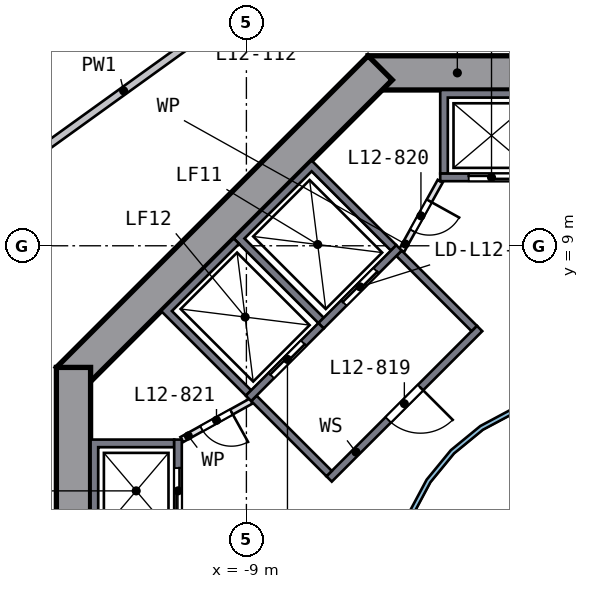
"""IFC4 building model, lengths in metres.
Left out: names, types, materials, properties, quantities, classifications, styles, units other than length and angle.
Written with IfcOpenShell. Run it as: python <this file> out.ifc"""

import sys

from ifc_helpers import new_model, si_unit, direction, frame, frame_2d, origin, place, context, subcontext, project, spatial, polyline, rectangle, outline, extrude, element, fill, save


model = new_model("IFC4")
c1 = context("Model", 3, precision=1e-05, world=origin(), true_north=direction((0.0, 1.0)))
c2 = subcontext(c1, "Body", "Model", "MODEL_VIEW")
j1 = project(units=[si_unit("LENGTHUNIT", "METRE"), si_unit("PLANEANGLEUNIT", "RADIAN")], contexts=[c1])
p1 = place(None, origin())
s1 = spatial("IfcSite", under=j1, at=p1, CompositionType="ELEMENT")
p2 = place(p1, origin())
s2 = spatial("IfcBuilding", under=s1, at=p2, CompositionType="ELEMENT")
p3 = place(p2, frame((0.0, 0.0, 56.5)))
s3 = spatial("IfcBuildingStorey", under=s2, at=p3, CompositionType="ELEMENT", Elevation=56.5)
p4 = place(p3, frame((5.799, 13.55, 0.0), z_axis=(0.0, 0.0, 1.0), x_axis=(-1.0, 0.0, 0.0)))
e1 = element("IfcWall", 1, at=p4, inside=s3, PredefinedType="SHEAR", context=c2, shape_type="SweptSolid", body=[
    extrude(rectangle(XDim=11.598, YDim=0.9, at=frame_2d((5.799, 0.0))), origin(), (0.0, 0.0, 1.0), 3.5),
])
p5 = place(p4, frame((4.899, 0.0, 0.0)))
e2 = element("IfcOpeningElement", 2, at=p5, cuts=e1, PredefinedType="OPENING", context=c2, shape_type="SweptSolid", body=[
    extrude(rectangle(XDim=1.8, YDim=2.1, at=frame_2d((0.9, 1.05))), frame((0.0, 0.46, 0.0), z_axis=(0.0, -1.0, 0.0), x_axis=(1.0, 0.0, 0.0)), (0.0, 0.0, 1.0), 0.92),
])
p6 = place(p3, frame((-5.481, 13.682, 0.0), z_axis=(0.0, 0.0, 1.0), x_axis=(-0.707106781, -0.707106781, 0.0)))
e3 = element("IfcWall", 3, at=p6, inside=s3, PredefinedType="SHEAR", context=c2, shape_type="SweptSolid", body=[
    extrude(rectangle(XDim=11.598, YDim=0.9, at=frame_2d((5.799, 0.0))), origin(), (0.0, 0.0, 1.0), 3.5),
])
p7 = place(p3, frame((-13.55, 5.799, 0.0), z_axis=(0.0, 0.0, 1.0), x_axis=(0.0, -1.0, 0.0)))
e4 = element("IfcWall", 4, at=p7, inside=s3, PredefinedType="SHEAR", context=c2, shape_type="SweptSolid", body=[
    extrude(rectangle(XDim=11.598, YDim=0.9, at=frame_2d((5.799, 0.0))), origin(), (0.0, 0.0, 1.0), 3.5),
])
p8 = place(p7, frame((4.899, 0.0, 0.0)))
e5 = element("IfcOpeningElement", 5, at=p8, cuts=e4, PredefinedType="OPENING", context=c2, shape_type="SweptSolid", body=[
    extrude(rectangle(XDim=1.8, YDim=2.1, at=frame_2d((0.9, 1.05))), frame((0.0, 0.46, 0.0), z_axis=(0.0, -1.0, 0.0), x_axis=(1.0, 0.0, 0.0)), (0.0, 0.0, 1.0), 0.92),
])
p9 = place(p3, origin())
e6 = element("IfcWall", 6, at=p9, inside=s3, PredefinedType="SOLIDWALL", context=c2, shape_type="SweptSolid", body=[
    extrude(outline(polyline([(-3.9, 10.9), (-3.9, 13.1), (-1.2, 13.1), (-1.2, 10.9), (-1.4, 10.9), (-1.4, 12.9), (-3.7, 12.9), (-3.7, 10.9), (-3.9, 10.9)])), origin(), (0.0, 0.0, 1.0), 3.19),
])
p10 = place(p3, frame((-1.2, 10.8, 0.0), z_axis=(0.0, 0.0, 1.0), x_axis=(-1.0, 0.0, 0.0)))
e7 = element("IfcWall", 7, at=p10, inside=s3, PredefinedType="SOLIDWALL", context=c2, shape_type="SweptSolid", body=[
    extrude(rectangle(XDim=2.7, YDim=0.2, at=frame_2d((1.35, 0.0))), origin(), (0.0, 0.0, 1.0), 3.19),
])
p11 = place(p10, frame((0.75, 0.0, 0.0)))
e8 = element("IfcOpeningElement", 8, at=p11, cuts=e7, PredefinedType="OPENING", context=c2, shape_type="SweptSolid", body=[
    extrude(rectangle(XDim=1.2, YDim=2.1, at=frame_2d((0.6, 1.05))), frame((0.0, 0.11, 0.0), z_axis=(0.0, -1.0, 0.0), x_axis=(1.0, 0.0, 0.0)), (0.0, 0.0, 1.0), 0.22),
])
p12 = place(p3, origin())
e9 = element("IfcWall", 9, at=p12, inside=s3, PredefinedType="SOLIDWALL", context=c2, shape_type="SweptSolid", body=[
    extrude(outline(polyline([(-13.1, 3.9), (-10.9, 3.9), (-10.9, 3.7), (-12.9, 3.7), (-12.9, 1.4), (-10.9, 1.4), (-10.9, 1.2), (-13.1, 1.2), (-13.1, 3.9)])), origin(), (0.0, 0.0, 1.0), 3.19),
])
p13 = place(p3, frame((-10.8, 1.2, 0.0), z_axis=(0.0, 0.0, 1.0), x_axis=(0.0, 1.0, 0.0)))
e10 = element("IfcWall", 10, at=p13, inside=s3, PredefinedType="SOLIDWALL", context=c2, shape_type="SweptSolid", body=[
    extrude(rectangle(XDim=2.7, YDim=0.2, at=frame_2d((1.35, 0.0))), origin(), (0.0, 0.0, 1.0), 3.19),
])
p14 = place(p13, frame((0.75, 0.0, 0.0)))
e11 = element("IfcOpeningElement", 11, at=p14, cuts=e10, PredefinedType="OPENING", context=c2, shape_type="SweptSolid", body=[
    extrude(rectangle(XDim=1.2, YDim=2.1, at=frame_2d((0.6, 1.05))), frame((0.0, 0.11, 0.0), z_axis=(0.0, -1.0, 0.0), x_axis=(1.0, 0.0, 0.0)), (0.0, 0.0, 1.0), 0.22),
])
p15 = place(p3, origin())
e12 = element("IfcWall", 12, at=p15, inside=s3, PredefinedType="SOLIDWALL", context=c2, shape_type="SweptSolid", body=[
    extrude(outline(polyline([(-9.334, 9.192), (-7.283, 11.243), (-5.056, 9.016), (-5.197, 8.874), (-7.283, 10.96), (-9.051, 9.192), (-6.965, 7.106), (-7.106, 6.965), (-9.334, 9.192)])), origin(), (0.0, 0.0, 1.0), 3.19),
])
p16 = place(p3, frame((-4.985, 8.945, 0.0), z_axis=(0.0, 0.0, 1.0), x_axis=(-0.707106781, -0.707106781, 0.0)))
e13 = element("IfcWall", 13, at=p16, inside=s3, PredefinedType="SOLIDWALL", context=c2, shape_type="SweptSolid", body=[
    extrude(rectangle(XDim=2.9, YDim=0.2, at=frame_2d((1.45, 0.0))), origin(), (0.0, 0.0, 1.0), 3.19),
])
p17 = place(p16, frame((0.85, 0.0, 0.0)))
e14 = element("IfcOpeningElement", 14, at=p17, cuts=e13, PredefinedType="OPENING", context=c2, shape_type="SweptSolid", body=[
    extrude(rectangle(XDim=1.2, YDim=2.1, at=frame_2d((0.6, 1.05))), frame((0.0, 0.11, 0.0), z_axis=(0.0, -1.0, 0.0), x_axis=(1.0, 0.0, 0.0)), (0.0, 0.0, 1.0), 0.22),
])
p18 = place(p3, origin())
e15 = element("IfcWall", 15, at=p18, inside=s3, PredefinedType="SOLIDWALL", context=c2, shape_type="SweptSolid", body=[
    extrude(outline(polyline([(-11.243, 7.283), (-9.334, 9.192), (-9.192, 9.051), (-10.96, 7.283), (-8.874, 5.197), (-9.016, 5.056), (-11.243, 7.283)])), origin(), (0.0, 0.0, 1.0), 3.19),
])
p19 = place(p3, frame((-7.036, 6.894, 0.0), z_axis=(0.0, 0.0, 1.0), x_axis=(-0.707106781, -0.707106781, 0.0)))
e16 = element("IfcWall", 16, at=p19, inside=s3, PredefinedType="SOLIDWALL", context=c2, shape_type="SweptSolid", body=[
    extrude(rectangle(XDim=2.7, YDim=0.2, at=frame_2d((1.35, 0.0))), origin(), (0.0, 0.0, 1.0), 3.19),
])
p20 = place(p19, frame((0.65, 0.0, 0.0)))
e17 = element("IfcOpeningElement", 17, at=p20, cuts=e16, PredefinedType="OPENING", context=c2, shape_type="SweptSolid", body=[
    extrude(rectangle(XDim=1.2, YDim=2.1, at=frame_2d((0.6, 1.05))), frame((0.0, 0.11, 0.0), z_axis=(0.0, -1.0, 0.0), x_axis=(1.0, 0.0, 0.0)), (0.0, 0.0, 1.0), 0.22),
])
p21 = place(p3, frame((-2.864, 6.823, 0.0), z_axis=(0.0, 0.0, 1.0), x_axis=(-0.707106781, -0.707106781, 0.0)))
e18 = element("IfcWall", 18, at=p21, inside=s3, PredefinedType="SOLIDWALL", context=c2, shape_type="SweptSolid", body=[
    extrude(rectangle(XDim=5.6, YDim=0.2, at=frame_2d((2.8, 0.0))), origin(), (0.0, 0.0, 1.0), 3.19),
])
p22 = place(p21, frame((2.2, 0.0, 0.0)))
e19 = element("IfcOpeningElement", 19, at=p22, cuts=e18, PredefinedType="OPENING", context=c2, shape_type="SweptSolid", body=[
    extrude(rectangle(XDim=1.2, YDim=2.1, at=frame_2d((0.6, 1.05))), frame((0.0, 0.11, 0.0), z_axis=(0.0, -1.0, 0.0), x_axis=(1.0, 0.0, 0.0)), (0.0, 0.0, 1.0), 0.22),
])
for number, where, z_axis, x_axis in (
    (20, (-3.005, 6.823, 0.0), (0.0, 0.0, 1.0), (-0.707, 0.707, 0.0)),
    (21, (-6.823, 3.005, 0.0), (0.0, 0.0, 1.0), (-0.707, 0.707, 0.0)),
):
    element("IfcWall", number, at=place(p3, frame(where, z_axis=z_axis, x_axis=x_axis)), inside=s3, PredefinedType="SOLIDWALL", context=c2, shape_type="SweptSolid", body=[
        extrude(rectangle(XDim=2.8, YDim=0.2, at=frame_2d((1.4, 0.0))), origin(), (0.0, 0.0, 1.0), 3.19),
    ])
p23 = place(p3, frame((-3.9, 10.7, 0.0), z_axis=(0.0, 0.0, 1.0), x_axis=(-0.485692555, -0.874129705, 0.0)))
e22 = element("IfcWall", 22, at=p23, inside=s3, PredefinedType="PARTITIONING", context=c2, shape_type="SweptSolid", body=[
    extrude(rectangle(XDim=2.089, YDim=0.15, at=frame_2d((1.044, 0.0))), origin(), (0.0, 0.0, 1.0), 3.19),
])
p24 = place(p23, frame((0.594, 0.0, 0.0)))
e23 = element("IfcOpeningElement", 23, at=p24, cuts=e22, PredefinedType="OPENING", context=c2, shape_type="SweptSolid", body=[
    extrude(rectangle(XDim=0.9, YDim=2.1, at=frame_2d((0.45, 1.05))), frame((0.0, 0.085, 0.0), z_axis=(0.0, -1.0, 0.0), x_axis=(1.0, 0.0, 0.0)), (0.0, 0.0, 1.0), 0.17),
])
p25 = place(p3, frame((-8.874, 4.914, 0.0), z_axis=(0.0, 0.0, 1.0), x_axis=(-0.874129705, -0.485692555, 0.0)))
e24 = element("IfcWall", 24, at=p25, inside=s3, PredefinedType="PARTITIONING", context=c2, shape_type="SweptSolid", body=[
    extrude(rectangle(XDim=2.089, YDim=0.15, at=frame_2d((1.044, 0.0))), origin(), (0.0, 0.0, 1.0), 3.19),
])
p26 = place(p25, frame((0.594, 0.0, 0.0)))
e25 = element("IfcOpeningElement", 25, at=p26, cuts=e24, PredefinedType="OPENING", context=c2, shape_type="SweptSolid", body=[
    extrude(rectangle(XDim=0.9, YDim=2.1, at=frame_2d((0.45, 1.05))), frame((0.0, 0.085, 0.0), z_axis=(0.0, -1.0, 0.0), x_axis=(1.0, 0.0, 0.0)), (0.0, 0.0, 1.0), 0.17),
])
p27 = place(p3, origin())
e26 = element("IfcWall", 26, at=p27, inside=s3, PredefinedType="SOLIDWALL", context=c2, shape_type="SweptSolid", body=[
    extrude(outline(polyline([(5.021, -0.999), (4.73, -1.959), (4.257, -2.844), (3.62, -3.62), (2.844, -4.257), (1.959, -4.73), (0.999, -5.021), (0.0, -5.12), (-0.999, -5.021), (-1.959, -4.73), (-2.844, -4.257), (-3.62, -3.62), (-4.257, -2.844), (-4.73, -1.959), (-5.021, -0.999), (-5.12, 0.0), (-5.021, 0.999), (-4.73, 1.959), (-4.257, 2.844), (-3.62, 3.62), (-2.844, 4.257), (-1.959, 4.73), (-0.999, 5.021), (0.0, 5.12), (0.999, 5.021), (1.959, 4.73), (2.844, 4.257), (3.62, 3.62), (4.257, 2.844), (4.73, 1.959), (5.021, 0.999), (5.12, 0.0), (5.021, -0.999)]), holes=[polyline([(4.904, 0.976), (4.619, 1.913), (4.157, 2.778), (3.535, 3.535), (2.778, 4.157), (1.913, 4.619), (0.976, 4.904), (0.0, 5.0), (-0.976, 4.904), (-1.913, 4.619), (-2.778, 4.157), (-3.535, 3.535), (-4.157, 2.778), (-4.619, 1.913), (-4.904, 0.976), (-5.0, 0.0), (-4.904, -0.976), (-4.619, -1.913), (-4.157, -2.778), (-3.535, -3.535), (-2.778, -4.157), (-1.913, -4.619), (-0.976, -4.904), (0.0, -5.0), (0.976, -4.904), (1.913, -4.619), (2.778, -4.157), (3.535, -3.535), (4.157, -2.778), (4.619, -1.913), (4.904, -0.976), (5.0, 0.0), (4.904, 0.976)])]), origin(), (0.0, 0.0, 1.0), 3.19),
])
p28 = place(p3, frame((-14.239, 11.63, 0.0), z_axis=(0.0, 0.0, 1.0), x_axis=(0.811460769, 0.584406897, 0.0)))
e27 = element("IfcWall", 27, at=p28, inside=s3, PredefinedType="SOLIDWALL", context=c2, shape_type="SweptSolid", body=[
    extrude(rectangle(XDim=9.316, YDim=0.2, at=frame_2d((4.658, 0.0))), origin(), (0.0, 0.0, 1.0), 3.19),
])
p29 = place(p28, frame((5.15, 0.0, 0.0)))
e28 = element("IfcOpeningElement", 28, at=p29, cuts=e27, PredefinedType="OPENING", context=c2, shape_type="SweptSolid", body=[
    extrude(rectangle(XDim=1.0, YDim=2.1, at=frame_2d((0.5, 1.05))), frame((0.0, 0.11, 0.0), z_axis=(0.0, -1.0, 0.0), x_axis=(1.0, 0.0, 0.0)), (0.0, 0.0, 1.0), 0.22),
])
p30 = place(p11, origin())
e29 = element("IfcDoor", 29, at=p30, inside=s3, OperationType="DOUBLE_DOOR_SLIDING", PredefinedType="DOOR", context=c2, shape_type="SweptSolid", body=[
    extrude(rectangle(XDim=1.2, YDim=2.1, at=frame_2d((0.6, 1.05))), frame((0.0, 0.025, 0.0), z_axis=(0.0, -1.0, 0.0), x_axis=(1.0, 0.0, 0.0)), (0.0, 0.0, 1.0), 0.05),
])
fill(e8, e29)
p31 = place(p14, origin())
e30 = element("IfcDoor", 30, at=p31, inside=s3, OperationType="DOUBLE_DOOR_SLIDING", PredefinedType="DOOR", context=c2, shape_type="SweptSolid", body=[
    extrude(rectangle(XDim=1.2, YDim=2.1, at=frame_2d((0.6, 1.05))), frame((0.0, 0.025, 0.0), z_axis=(0.0, -1.0, 0.0), x_axis=(1.0, 0.0, 0.0)), (0.0, 0.0, 1.0), 0.05),
])
fill(e11, e30)
p32 = place(p17, origin())
e31 = element("IfcDoor", 31, at=p32, inside=s3, OperationType="DOUBLE_DOOR_SLIDING", PredefinedType="DOOR", context=c2, shape_type="SweptSolid", body=[
    extrude(rectangle(XDim=1.2, YDim=2.1, at=frame_2d((0.6, 1.05))), frame((0.0, 0.025, 0.0), z_axis=(0.0, -1.0, 0.0), x_axis=(1.0, 0.0, 0.0)), (0.0, 0.0, 1.0), 0.05),
])
fill(e14, e31)
p33 = place(p20, origin())
e32 = element("IfcDoor", 32, at=p33, inside=s3, OperationType="DOUBLE_DOOR_SLIDING", PredefinedType="DOOR", context=c2, shape_type="SweptSolid", body=[
    extrude(rectangle(XDim=1.2, YDim=2.1, at=frame_2d((0.6, 1.05))), frame((0.0, 0.025, 0.0), z_axis=(0.0, -1.0, 0.0), x_axis=(1.0, 0.0, 0.0)), (0.0, 0.0, 1.0), 0.05),
])
fill(e17, e32)
p34 = place(p22, origin())
e33 = element("IfcDoor", 33, at=p34, inside=s3, OperationType="SINGLE_SWING_LEFT", PredefinedType="DOOR", context=c2, shape_type="SweptSolid", body=[
    extrude(rectangle(XDim=1.2, YDim=2.1, at=frame_2d((0.6, 1.05))), frame((0.0, 0.025, 0.0), z_axis=(0.0, -1.0, 0.0), x_axis=(1.0, 0.0, 0.0)), (0.0, 0.0, 1.0), 0.05),
])
fill(e19, e33)
p35 = place(p24, origin())
e34 = element("IfcDoor", 34, at=p35, inside=s3, OperationType="SINGLE_SWING_LEFT", PredefinedType="DOOR", context=c2, shape_type="SweptSolid", body=[
    extrude(rectangle(XDim=0.9, YDim=2.1, at=frame_2d((0.45, 1.05))), frame((0.0, 0.025, 0.0), z_axis=(0.0, -1.0, 0.0), x_axis=(1.0, 0.0, 0.0)), (0.0, 0.0, 1.0), 0.05),
])
fill(e23, e34)
p36 = place(p26, origin())
e35 = element("IfcDoor", 35, at=p36, inside=s3, OperationType="SINGLE_SWING_LEFT", PredefinedType="DOOR", context=c2, shape_type="SweptSolid", body=[
    extrude(rectangle(XDim=0.9, YDim=2.1, at=frame_2d((0.45, 1.05))), frame((0.0, 0.025, 0.0), z_axis=(0.0, -1.0, 0.0), x_axis=(1.0, 0.0, 0.0)), (0.0, 0.0, 1.0), 0.05),
])
fill(e25, e35)
save(model, sys.argv[1])
